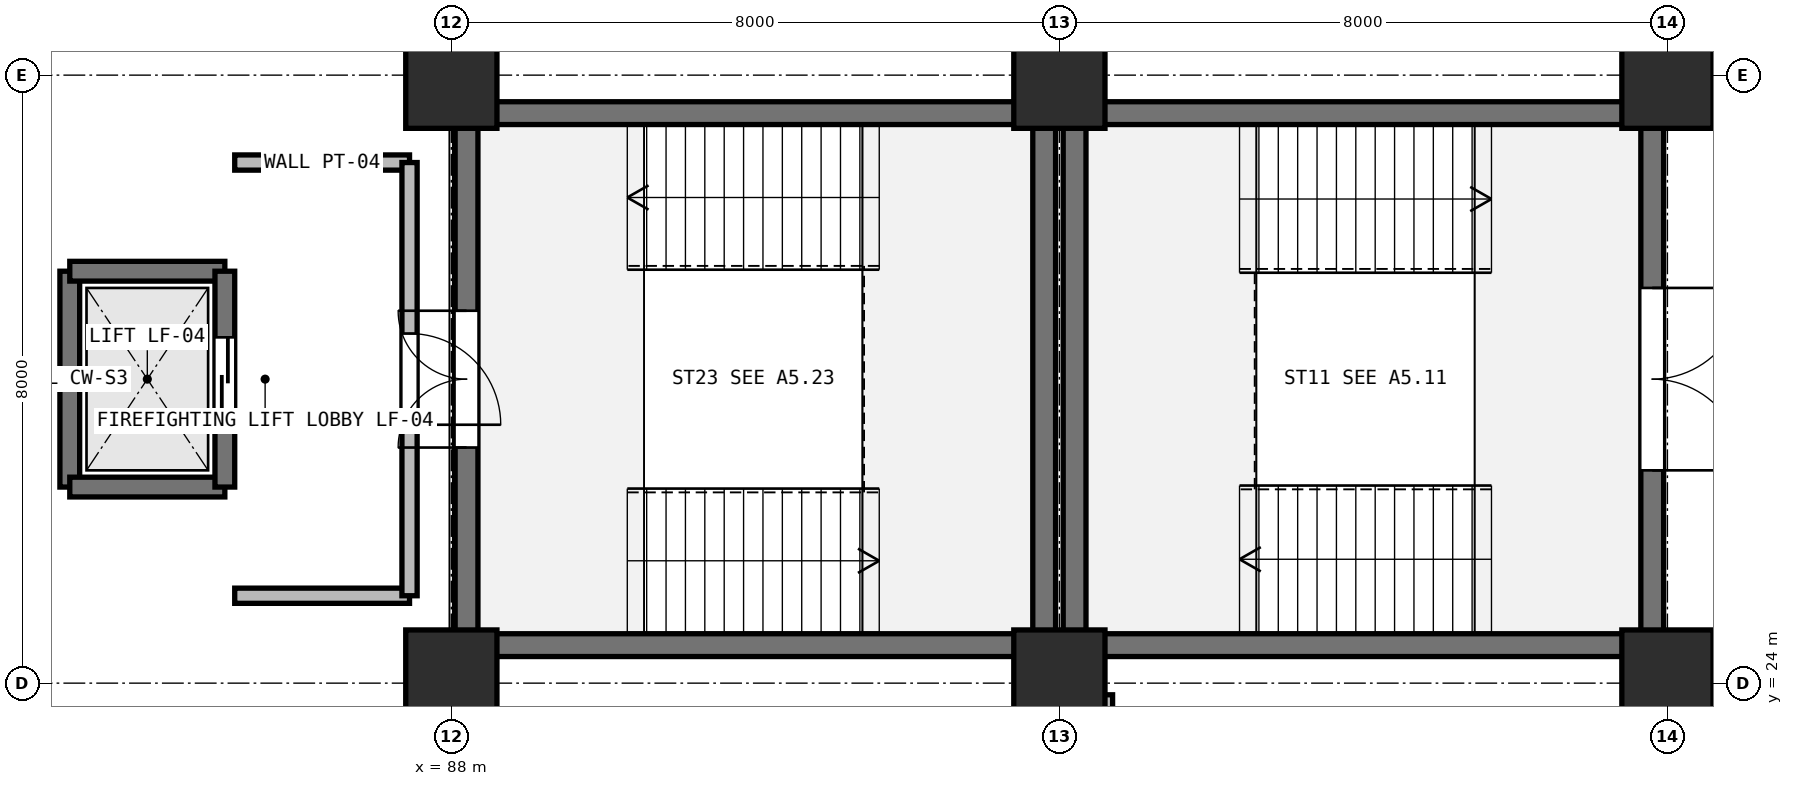
"""IFC4 building model, lengths in metres.
Left out: names, types, materials, properties, quantities, classifications, styles, units other than length and angle.
Written with IfcOpenShell. Run it as: python <this file> out.ifc"""

import sys

from ifc_helpers import new_model, si_unit, direction, frame, frame_2d, origin, origin_2d, place, context, subcontext, project, spatial, rectangle, extrude, element, fill, save


model = new_model("IFC4")
c1 = context("Model", 3, precision=1e-05, world=origin(), true_north=direction((0.0, 1.0)))
c2 = subcontext(c1, "Body", "Model", "MODEL_VIEW")
j1 = project(units=[si_unit("LENGTHUNIT", "METRE"), si_unit("PLANEANGLEUNIT", "RADIAN")], contexts=[c1])
p1 = place(None, origin())
s1 = spatial("IfcSite", under=j1, at=p1, CompositionType="ELEMENT")
p2 = place(p1, origin())
s2 = spatial("IfcBuilding", under=s1, at=p2, CompositionType="ELEMENT")
p3 = place(p2, frame((0.0, 0.0, -4.8)))
s3 = spatial("IfcBuildingStorey", under=s2, at=p3, CompositionType="ELEMENT", Elevation=-4.8)
for number, where, z_axis, x_axis in (
    (1, (88.0, 24.0, 0.0), (0.0, 0.0, 1.0), (1.0, 0.0, 0.0)),
    (2, (88.0, 32.0, 0.0), (0.0, 0.0, 1.0), (1.0, 0.0, 0.0)),
    (3, (96.0, 24.0, 0.0), (0.0, 0.0, 1.0), (1.0, 0.0, 0.0)),
    (4, (96.0, 32.0, 0.0), (0.0, 0.0, 1.0), (1.0, 0.0, 0.0)),
    (5, (104.0, 24.0, 0.0), (0.0, 0.0, 1.0), (1.0, 0.0, 0.0)),
    (6, (104.0, 32.0, 0.0), (0.0, 0.0, 1.0), (1.0, 0.0, 0.0)),
):
    element("IfcColumn", number, at=place(p3, frame(where, z_axis=z_axis, x_axis=x_axis)), inside=s3, PredefinedType="COLUMN", context=c2, shape_type="SweptSolid", body=[
        extrude(rectangle(XDim=1.2, YDim=1.4, at=origin_2d()), origin(), (0.0, 0.0, 1.0), 4.8),
    ])
p4 = place(p3, frame((103.8, 24.5, 0.0), z_axis=(0.0, 0.0, 1.0), x_axis=(-1.0, 0.0, 0.0)))
e7 = element("IfcWall", 7, at=p4, inside=s3, PredefinedType="SHEAR", context=c2, shape_type="SweptSolid", body=[
    extrude(rectangle(XDim=7.6, YDim=0.3, at=frame_2d((3.8, 0.0))), origin(), (0.0, 0.0, 1.0), 4.46),
])
p5 = place(p3, frame((96.2, 24.5, 0.0), z_axis=(0.0, 0.0, 1.0), x_axis=(0.0, 1.0, 0.0)))
e8 = element("IfcWall", 8, at=p5, inside=s3, PredefinedType="SHEAR", context=c2, shape_type="SweptSolid", body=[
    extrude(rectangle(XDim=7.0, YDim=0.3, at=frame_2d((3.5, 0.0))), origin(), (0.0, 0.0, 1.0), 4.46),
])
p6 = place(p3, frame((96.2, 31.5, 0.0), z_axis=(0.0, 0.0, 1.0), x_axis=(1.0, 0.0, 0.0)))
e9 = element("IfcWall", 9, at=p6, inside=s3, PredefinedType="SHEAR", context=c2, shape_type="SweptSolid", body=[
    extrude(rectangle(XDim=7.6, YDim=0.3, at=frame_2d((3.8, 0.0))), origin(), (0.0, 0.0, 1.0), 4.46),
])
p7 = place(p3, frame((103.8, 31.5, 0.0), z_axis=(0.0, 0.0, 1.0), x_axis=(0.0, -1.0, 0.0)))
e10 = element("IfcWall", 10, at=p7, inside=s3, PredefinedType="SHEAR", context=c2, shape_type="SweptSolid", body=[
    extrude(rectangle(XDim=7.0, YDim=0.3, at=frame_2d((3.5, 0.0))), origin(), (0.0, 0.0, 1.0), 4.46),
])
p8 = place(p7, frame((2.3, 0.0, 0.0)))
e11 = element("IfcOpeningElement", 11, at=p8, cuts=e10, PredefinedType="OPENING", context=c2, shape_type="SweptSolid", body=[
    extrude(rectangle(XDim=2.4, YDim=2.2, at=frame_2d((1.2, 1.1))), frame((0.0, 0.16, 0.0), z_axis=(0.0, -1.0, 0.0), x_axis=(1.0, 0.0, 0.0)), (0.0, 0.0, 1.0), 0.32),
])
p9 = place(p3, frame((95.8, 24.5, 0.0), z_axis=(0.0, 0.0, 1.0), x_axis=(-1.0, 0.0, 0.0)))
e12 = element("IfcWall", 12, at=p9, inside=s3, PredefinedType="SHEAR", context=c2, shape_type="SweptSolid", body=[
    extrude(rectangle(XDim=7.6, YDim=0.3, at=frame_2d((3.8, 0.0))), origin(), (0.0, 0.0, 1.0), 4.46),
])
p10 = place(p3, frame((88.2, 24.5, 0.0), z_axis=(0.0, 0.0, 1.0), x_axis=(0.0, 1.0, 0.0)))
e13 = element("IfcWall", 13, at=p10, inside=s3, PredefinedType="SHEAR", context=c2, shape_type="SweptSolid", body=[
    extrude(rectangle(XDim=7.0, YDim=0.3, at=frame_2d((3.5, 0.0))), origin(), (0.0, 0.0, 1.0), 4.46),
])
p11 = place(p10, frame((2.6, 0.0, 0.0)))
e14 = element("IfcOpeningElement", 14, at=p11, cuts=e13, PredefinedType="OPENING", context=c2, shape_type="SweptSolid", body=[
    extrude(rectangle(XDim=1.8, YDim=2.2, at=frame_2d((0.9, 1.1))), frame((0.0, 0.16, 0.0), z_axis=(0.0, -1.0, 0.0), x_axis=(1.0, 0.0, 0.0)), (0.0, 0.0, 1.0), 0.32),
])
p12 = place(p3, frame((88.2, 31.5, 0.0), z_axis=(0.0, 0.0, 1.0), x_axis=(1.0, 0.0, 0.0)))
e15 = element("IfcWall", 15, at=p12, inside=s3, PredefinedType="SHEAR", context=c2, shape_type="SweptSolid", body=[
    extrude(rectangle(XDim=7.6, YDim=0.3, at=frame_2d((3.8, 0.0))), origin(), (0.0, 0.0, 1.0), 4.46),
])
p13 = place(p3, frame((95.8, 31.5, 0.0), z_axis=(0.0, 0.0, 1.0), x_axis=(0.0, -1.0, 0.0)))
e16 = element("IfcWall", 16, at=p13, inside=s3, PredefinedType="SHEAR", context=c2, shape_type="SweptSolid", body=[
    extrude(rectangle(XDim=7.0, YDim=0.3, at=frame_2d((3.5, 0.0))), origin(), (0.0, 0.0, 1.0), 4.46),
])
p14 = place(p3, frame((82.98, 26.58, 0.0), z_axis=(0.0, 0.0, 1.0), x_axis=(0.0, 1.0, 0.0)))
e17 = element("IfcWall", 17, at=p14, inside=s3, PredefinedType="SHEAR", context=c2, shape_type="SweptSolid", body=[
    extrude(rectangle(XDim=2.84, YDim=0.26, at=frame_2d((1.42, 0.0))), origin(), (0.0, 0.0, 1.0), 4.46),
])
for number, where, z_axis, x_axis in (
    (18, (82.98, 29.42, 0.0), (0.0, 0.0, 1.0), (1.0, 0.0, 0.0)),
    (19, (85.02, 26.58, 0.0), (0.0, 0.0, 1.0), (-1.0, 0.0, 0.0)),
):
    element("IfcWall", number, at=place(p3, frame(where, z_axis=z_axis, x_axis=x_axis)), inside=s3, PredefinedType="SHEAR", context=c2, shape_type="SweptSolid", body=[
        extrude(rectangle(XDim=2.04, YDim=0.26, at=frame_2d((1.02, 0.0))), origin(), (0.0, 0.0, 1.0), 4.46),
    ])
p15 = place(p3, frame((85.02, 29.42, 0.0), z_axis=(0.0, 0.0, 1.0), x_axis=(0.0, -1.0, 0.0)))
e20 = element("IfcWall", 20, at=p15, inside=s3, PredefinedType="SHEAR", context=c2, shape_type="SweptSolid", body=[
    extrude(rectangle(XDim=2.84, YDim=0.26, at=frame_2d((1.42, 0.0))), origin(), (0.0, 0.0, 1.0), 4.46),
])
p16 = place(p15, frame((0.87, 0.0, 0.0)))
e21 = element("IfcOpeningElement", 21, at=p16, cuts=e20, PredefinedType="OPENING", context=c2, shape_type="SweptSolid", body=[
    extrude(rectangle(XDim=1.1, YDim=2.15, at=frame_2d((0.55, 1.075))), frame((0.0, 0.14, 0.0), z_axis=(0.0, -1.0, 0.0), x_axis=(1.0, 0.0, 0.0)), (0.0, 0.0, 1.0), 0.28),
])
for number, where, z_axis, x_axis in (
    (22, (85.15, 30.85, 0.0), (0.0, 0.0, 1.0), (1.0, 0.0, 0.0)),
    (23, (87.45, 25.15, 0.0), (0.0, 0.0, 1.0), (-1.0, 0.0, 0.0)),
):
    element("IfcWall", number, at=place(p3, frame(where, z_axis=z_axis, x_axis=x_axis)), inside=s3, PredefinedType="PARTITIONING", context=c2, shape_type="SweptSolid", body=[
        extrude(rectangle(XDim=2.3, YDim=0.2, at=frame_2d((1.15, 0.0))), origin(), (0.0, 0.0, 1.0), 4.46),
    ])
p17 = place(p3, frame((87.45, 30.85, 0.0), z_axis=(0.0, 0.0, 1.0), x_axis=(0.0, -1.0, 0.0)))
e24 = element("IfcWall", 24, at=p17, inside=s3, PredefinedType="PARTITIONING", context=c2, shape_type="SweptSolid", body=[
    extrude(rectangle(XDim=5.7, YDim=0.2, at=frame_2d((2.85, 0.0))), origin(), (0.0, 0.0, 1.0), 3.45),
])
p18 = place(p17, frame((2.25, 0.0, 0.0)))
e25 = element("IfcOpeningElement", 25, at=p18, cuts=e24, PredefinedType="OPENING", context=c2, shape_type="SweptSolid", body=[
    extrude(rectangle(XDim=1.2, YDim=2.2, at=frame_2d((0.6, 1.1))), frame((0.0, 0.11, 0.0), z_axis=(0.0, -1.0, 0.0), x_axis=(1.0, 0.0, 0.0)), (0.0, 0.0, 1.0), 0.22),
])
p19 = place(p3, frame((96.6, 16.38, 0.0), z_axis=(0.0, 0.0, 1.0), x_axis=(0.0, 1.0, 0.0)))
e26 = element("IfcWall", 26, at=p19, inside=s3, PredefinedType="PARTITIONING", context=c2, shape_type="SweptSolid", body=[
    extrude(rectangle(XDim=7.467, YDim=0.2, at=frame_2d((3.733, 0.0))), origin(), (0.0, 0.0, 1.0), 3.45),
])
p20 = place(p19, frame((2.983, 0.0, 0.0)))
e27 = element("IfcOpeningElement", 27, at=p20, cuts=e26, PredefinedType="OPENING", context=c2, shape_type="SweptSolid", body=[
    extrude(rectangle(XDim=1.5, YDim=2.2, at=frame_2d((0.75, 1.1))), frame((0.0, 0.11, 0.0), z_axis=(0.0, -1.0, 0.0), x_axis=(1.0, 0.0, 0.0)), (0.0, 0.0, 1.0), 0.22),
])
p21 = place(p8, frame((2.4, 0.0, 0.0), z_axis=(0.0, 0.0, 1.0), x_axis=(-1.0, 0.0, 0.0)))
e28 = element("IfcDoor", 28, at=p21, inside=s3, OperationType="DOUBLE_DOOR_SINGLE_SWING", PredefinedType="DOOR", context=c2, shape_type="SweptSolid", body=[
    extrude(rectangle(XDim=2.4, YDim=2.2, at=frame_2d((1.2, 1.1))), frame((0.0, 0.025, 0.0), z_axis=(0.0, -1.0, 0.0), x_axis=(1.0, 0.0, 0.0)), (0.0, 0.0, 1.0), 0.05),
])
fill(e11, e28)
p22 = place(p11, frame((1.8, 0.0, 0.0), z_axis=(0.0, 0.0, 1.0), x_axis=(-1.0, 0.0, 0.0)))
e29 = element("IfcDoor", 29, at=p22, inside=s3, OperationType="DOUBLE_DOOR_SINGLE_SWING", PredefinedType="DOOR", context=c2, shape_type="SweptSolid", body=[
    extrude(rectangle(XDim=1.8, YDim=2.2, at=frame_2d((0.9, 1.1))), frame((0.0, 0.025, 0.0), z_axis=(0.0, -1.0, 0.0), x_axis=(1.0, 0.0, 0.0)), (0.0, 0.0, 1.0), 0.05),
])
fill(e14, e29)
p23 = place(p16, origin())
e30 = element("IfcDoor", 30, at=p23, inside=s3, OperationType="SLIDING_TO_LEFT", PredefinedType="DOOR", context=c2, shape_type="SweptSolid", body=[
    extrude(rectangle(XDim=1.1, YDim=2.15, at=frame_2d((0.55, 1.075))), frame((0.0, 0.025, 0.0), z_axis=(0.0, -1.0, 0.0), x_axis=(1.0, 0.0, 0.0)), (0.0, 0.0, 1.0), 0.05),
])
fill(e21, e30)
p24 = place(p18, origin())
e31 = element("IfcDoor", 31, at=p24, inside=s3, OperationType="SINGLE_SWING_RIGHT", PredefinedType="DOOR", context=c2, shape_type="SweptSolid", body=[
    extrude(rectangle(XDim=1.2, YDim=2.2, at=frame_2d((0.6, 1.1))), frame((0.0, 0.025, 0.0), z_axis=(0.0, -1.0, 0.0), x_axis=(1.0, 0.0, 0.0)), (0.0, 0.0, 1.0), 0.05),
])
fill(e25, e31)
save(model, sys.argv[1])
